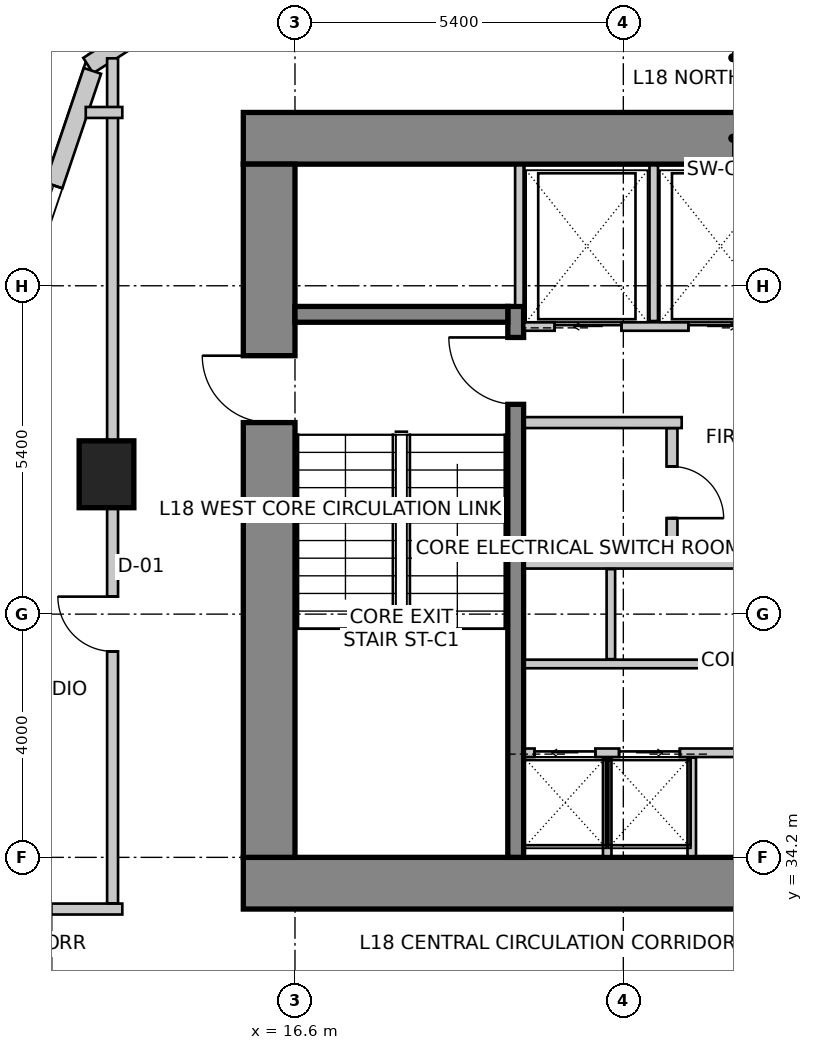
"""IFC4 building model, lengths in metres.
Left out: names, types, materials, properties, quantities, classifications, styles, units other than length and angle.
Written with IfcOpenShell. Run it as: python <this file> out.ifc"""

import sys

from ifc_helpers import new_model, si_unit, direction, frame, frame_2d, origin, origin_2d, place, context, subcontext, project, spatial, rectangle, extrude, source, transform, mapped, element, fill, save


model = new_model("IFC4")
c1 = context("Model", 3, precision=1e-05, world=origin(), true_north=direction((0.0, 1.0)))
c2 = subcontext(c1, "Body", "Model", "MODEL_VIEW")
j1 = project(units=[si_unit("LENGTHUNIT", "METRE"), si_unit("PLANEANGLEUNIT", "RADIAN")], contexts=[c1])
p1 = place(None, origin())
s1 = spatial("IfcSite", under=j1, at=p1, CompositionType="ELEMENT")
p2 = place(p1, origin())
s2 = spatial("IfcBuilding", under=s1, at=p2, CompositionType="ELEMENT")
p3 = place(p2, frame((0.0, 0.0, 75.0)))
s3 = spatial("IfcBuildingStorey", under=s2, at=p3, CompositionType="ELEMENT", Elevation=75.0)
p4 = place(p3, frame((15.75, 46.025, 0.0), z_axis=(0.0, 0.0, 1.0), x_axis=(1.0, 0.0, 0.0)))
e1 = element("IfcWall", 1, at=p4, inside=s3, PredefinedType="SHEAR", context=c2, shape_type="SweptSolid", body=[
    extrude(rectangle(XDim=16.1, YDim=0.85, at=frame_2d((8.05, 0.0))), origin(), (0.0, 0.0, 1.0), 4.0),
])
p5 = place(p3, frame((15.75, 33.775, 0.0), z_axis=(0.0, 0.0, 1.0), x_axis=(1.0, 0.0, 0.0)))
e2 = element("IfcWall", 2, at=p5, inside=s3, PredefinedType="SHEAR", context=c2, shape_type="SweptSolid", body=[
    extrude(rectangle(XDim=16.1, YDim=0.85, at=frame_2d((8.05, 0.0))), origin(), (0.0, 0.0, 1.0), 4.0),
])
m1 = source(origin(), c2, "Body", "SweptSolid", [
    extrude(rectangle(XDim=1.3, YDim=2.15, at=frame_2d((0.65, 1.075))), frame((0.0, 0.435, 0.0), z_axis=(0.0, -1.0, 0.0), x_axis=(1.0, 0.0, 0.0)), (0.0, 0.0, 1.0), 0.87),
])
p6 = place(p5, frame((10.18, 0.0, 0.0)))
e3 = element("IfcOpeningElement", 3, at=p6, cuts=e2, PredefinedType="OPENING", context=c2, shape_type="MappedRepresentation", body=[
    mapped(m1, transform((0.0, 0.0, 0.0), scale=1.0)),
])
p7 = place(p3, frame((16.175, 34.2, 0.0), z_axis=(0.0, 0.0, 1.0), x_axis=(0.0, 1.0, 0.0)))
e4 = element("IfcWall", 4, at=p7, inside=s3, PredefinedType="SHEAR", context=c2, shape_type="SweptSolid", body=[
    extrude(rectangle(XDim=11.4, YDim=0.85, at=frame_2d((5.7, 0.0))), origin(), (0.0, 0.0, 1.0), 4.0),
])
m2 = source(origin(), c2, "Body", "SweptSolid", [
    extrude(rectangle(XDim=1.1, YDim=2.15, at=frame_2d((0.55, 1.075))), frame((0.0, 0.435, 0.0), z_axis=(0.0, -1.0, 0.0), x_axis=(1.0, 0.0, 0.0)), (0.0, 0.0, 1.0), 0.87),
])
p8 = place(p7, frame((7.15, 0.0, 0.0)))
e5 = element("IfcOpeningElement", 5, at=p8, cuts=e4, PredefinedType="OPENING", context=c2, shape_type="MappedRepresentation", body=[
    mapped(m2, transform((0.0, 0.0, 0.0), scale=1.0)),
])
p9 = place(p3, frame((20.23, 34.2, 0.0), z_axis=(0.0, 0.0, 1.0), x_axis=(0.0, 1.0, 0.0)))
e6 = element("IfcWall", 6, at=p9, inside=s3, PredefinedType="SHEAR", context=c2, shape_type="SweptSolid", body=[
    extrude(rectangle(XDim=9.06, YDim=0.26, at=frame_2d((4.53, 0.0))), origin(), (0.0, 0.0, 1.0), 4.0),
])
m3 = source(origin(), c2, "Body", "SweptSolid", [
    extrude(rectangle(XDim=1.1, YDim=2.15, at=frame_2d((0.55, 1.075))), frame((0.0, 0.14, 0.0), z_axis=(0.0, -1.0, 0.0), x_axis=(1.0, 0.0, 0.0)), (0.0, 0.0, 1.0), 0.28),
])
p10 = place(p9, frame((7.45, 0.0, 0.0)))
e7 = element("IfcOpeningElement", 7, at=p10, cuts=e6, PredefinedType="OPENING", context=c2, shape_type="MappedRepresentation", body=[
    mapped(m3, transform((0.0, 0.0, 0.0), scale=1.0)),
])
p11 = place(p3, frame((16.6, 43.13, 0.0), z_axis=(0.0, 0.0, 1.0), x_axis=(1.0, 0.0, 0.0)))
e8 = element("IfcWall", 8, at=p11, inside=s3, PredefinedType="SHEAR", context=c2, shape_type="SweptSolid", body=[
    extrude(rectangle(XDim=3.5, YDim=0.26, at=frame_2d((1.75, 0.0))), origin(), (0.0, 0.0, 1.0), 4.0),
])
m4 = source(origin(), c2, "Body", "SweptSolid", [
    extrude(rectangle(XDim=0.9, YDim=1.1, at=origin_2d()), origin(), (0.0, 0.0, 1.0), 4.0),
])
p12 = place(p3, frame((13.5, 40.5, 0.0), z_axis=(0.0, 0.0, 1.0), x_axis=(1.0, 0.0, 0.0)))
e9 = element("IfcColumn", 9, at=p12, inside=s3, PredefinedType="COLUMN", context=c2, shape_type="MappedRepresentation", body=[
    mapped(m4, transform((0.0, 0.0, 0.0), scale=1.0)),
])
p13 = place(p3, frame((53.961, 47.417, 0.0), z_axis=(0.0, 0.0, 1.0), x_axis=(-0.985865713455, 0.167537443678, 0.0)))
e10 = element("IfcWall", 10, at=p13, inside=s3, PredefinedType="SOLIDWALL", context=c2, shape_type="SweptSolid", body=[
    extrude(rectangle(XDim=32.537, YDim=0.3, at=frame_2d((16.269, 0.0))), origin(), (0.0, 0.0, 1.0), 3.75),
])
m5 = source(origin(), c2, "Body", "SweptSolid", [
    extrude(rectangle(XDim=2.4, YDim=2.2, at=frame_2d((1.2, 1.1))), frame((0.0, 0.16, 0.0), z_axis=(0.0, -1.0, 0.0), x_axis=(1.0, 0.0, 0.0)), (0.0, 0.0, 1.0), 0.32),
])
p14 = place(p13, frame((0.375, 0.0, 0.85)))
e11 = element("IfcOpeningElement", 11, at=p14, cuts=e10, PredefinedType="OPENING", context=c2, shape_type="MappedRepresentation", body=[
    mapped(m5, transform((0.0, 0.0, 0.0), scale=1.0)),
])
m6 = source(origin(), c2, "Body", "SweptSolid", [
    extrude(rectangle(XDim=2.8, YDim=2.4, at=frame_2d((1.4, 1.2))), frame((0.0, 0.16, 0.0), z_axis=(0.0, -1.0, 0.0), x_axis=(1.0, 0.0, 0.0)), (0.0, 0.0, 1.0), 0.32),
])
p15 = place(p13, frame((3.822, 0.0, 0.85)))
e12 = element("IfcOpeningElement", 12, at=p15, cuts=e10, PredefinedType="OPENING", context=c2, shape_type="MappedRepresentation", body=[
    mapped(m6, transform((0.0, 0.0, 0.0), scale=1.0)),
])
p16 = place(p13, frame((8.168, 0.0, 0.85)))
e13 = element("IfcOpeningElement", 13, at=p16, cuts=e10, PredefinedType="OPENING", context=c2, shape_type="MappedRepresentation", body=[
    mapped(m6, transform((0.0, 0.0, 0.0), scale=1.0)),
])
p17 = place(p13, frame((12.513, 0.0, 0.85)))
e14 = element("IfcOpeningElement", 14, at=p17, cuts=e10, PredefinedType="OPENING", context=c2, shape_type="MappedRepresentation", body=[
    mapped(m6, transform((0.0, 0.0, 0.0), scale=1.0)),
])
p18 = place(p13, frame((18.36, 0.0, 0.85)))
e15 = element("IfcOpeningElement", 15, at=p18, cuts=e10, PredefinedType="OPENING", context=c2, shape_type="MappedRepresentation", body=[
    mapped(m6, transform((0.0, 0.0, 0.0), scale=1.0)),
])
p19 = place(p13, frame((24.895, 0.0, 0.85)))
e16 = element("IfcOpeningElement", 16, at=p19, cuts=e10, PredefinedType="OPENING", context=c2, shape_type="MappedRepresentation", body=[
    mapped(m6, transform((0.0, 0.0, 0.0), scale=1.0)),
])
p20 = place(p13, frame((29.395, 0.0, 0.85)))
e17 = element("IfcOpeningElement", 17, at=p20, cuts=e10, PredefinedType="OPENING", context=c2, shape_type="MappedRepresentation", body=[
    mapped(m6, transform((0.0, 0.0, 0.0), scale=1.0)),
])
p21 = place(p3, frame((21.875, 52.742, 0.0), z_axis=(0.0, 0.0, 1.0), x_axis=(-0.843662465249, -0.536873956092, 0.0)))
e18 = element("IfcWall", 18, at=p21, inside=s3, PredefinedType="SOLIDWALL", context=c2, shape_type="SweptSolid", body=[
    extrude(rectangle(XDim=10.284, YDim=0.3, at=frame_2d((5.142, 0.0))), origin(), (0.0, 0.0, 1.0), 3.75),
])
m7 = source(origin(), c2, "Body", "SweptSolid", [
    extrude(rectangle(XDim=0.9, YDim=1.6, at=frame_2d((0.45, 0.8))), frame((0.0, 0.16, 0.0), z_axis=(0.0, -1.0, 0.0), x_axis=(1.0, 0.0, 0.0)), (0.0, 0.0, 1.0), 0.32),
])
p22 = place(p21, frame((0.629, 0.0, 0.85)))
e19 = element("IfcOpeningElement", 19, at=p22, cuts=e18, PredefinedType="OPENING", context=c2, shape_type="MappedRepresentation", body=[
    mapped(m7, transform((0.0, 0.0, 0.0), scale=1.0)),
])
p23 = place(p21, frame((3.542, 0.0, 0.85)))
e20 = element("IfcOpeningElement", 20, at=p23, cuts=e18, PredefinedType="OPENING", context=c2, shape_type="MappedRepresentation", body=[
    mapped(m5, transform((0.0, 0.0, 0.0), scale=1.0)),
])
m8 = source(origin(), c2, "Body", "SweptSolid", [
    extrude(rectangle(XDim=1.5, YDim=1.8, at=frame_2d((0.75, 0.9))), frame((0.0, 0.16, 0.0), z_axis=(0.0, -1.0, 0.0), x_axis=(1.0, 0.0, 0.0)), (0.0, 0.0, 1.0), 0.32),
])
p24 = place(p21, frame((7.903, 0.0, 0.85)))
e21 = element("IfcOpeningElement", 21, at=p24, cuts=e18, PredefinedType="OPENING", context=c2, shape_type="MappedRepresentation", body=[
    mapped(m8, transform((0.0, 0.0, 0.0), scale=1.0)),
])
p25 = place(p3, frame((13.269, 47.134, 0.0), z_axis=(0.0, 0.0, 1.0), x_axis=(-0.319920423265, -0.947444416722, 0.0)))
e22 = element("IfcWall", 22, at=p25, inside=s3, PredefinedType="SOLIDWALL", context=c2, shape_type="SweptSolid", body=[
    extrude(rectangle(XDim=16.135, YDim=0.3, at=frame_2d((8.067, 0.0))), origin(), (0.0, 0.0, 1.0), 3.75),
])
p26 = place(p25, frame((1.988, 0.0, 0.85)))
e23 = element("IfcOpeningElement", 23, at=p26, cuts=e22, PredefinedType="OPENING", context=c2, shape_type="MappedRepresentation", body=[
    mapped(m6, transform((0.0, 0.0, 0.0), scale=1.0)),
])
p27 = place(p25, frame((7.159, 0.0, 0.85)))
e24 = element("IfcOpeningElement", 24, at=p27, cuts=e22, PredefinedType="OPENING", context=c2, shape_type="MappedRepresentation", body=[
    mapped(m5, transform((0.0, 0.0, 0.0), scale=1.0)),
])
p28 = place(p25, frame((11.93, 0.0, 0.85)))
e25 = element("IfcOpeningElement", 25, at=p28, cuts=e22, PredefinedType="OPENING", context=c2, shape_type="MappedRepresentation", body=[
    mapped(m6, transform((0.0, 0.0, 0.0), scale=1.0)),
])
p29 = place(p3, frame((20.37, 42.93, 0.0), z_axis=(0.0, 0.0, 1.0), x_axis=(1.0, 0.0, 0.0)))
e26 = element("IfcWall", 26, at=p29, inside=s3, PredefinedType="SOLIDWALL", context=c2, shape_type="SweptSolid", body=[
    extrude(rectangle(XDim=6.86, YDim=0.14, at=frame_2d((3.43, 0.0))), origin(), (0.0, 0.0, 1.0), 3.75),
])
m9 = source(origin(), c2, "Body", "SweptSolid", [
    extrude(rectangle(XDim=1.1, YDim=2.15, at=frame_2d((0.55, 1.075))), frame((0.0, 0.08, 0.0), z_axis=(0.0, -1.0, 0.0), x_axis=(1.0, 0.0, 0.0)), (0.0, 0.0, 1.0), 0.16),
])
p30 = place(p29, frame((0.5, 0.0, 0.0)))
e27 = element("IfcOpeningElement", 27, at=p30, cuts=e26, PredefinedType="OPENING", context=c2, shape_type="MappedRepresentation", body=[
    mapped(m9, transform((0.0, 0.0, 0.0), scale=1.0)),
])
p31 = place(p29, frame((2.7, 0.0, 0.0)))
e28 = element("IfcOpeningElement", 28, at=p31, cuts=e26, PredefinedType="OPENING", context=c2, shape_type="MappedRepresentation", body=[
    mapped(m9, transform((0.0, 0.0, 0.0), scale=1.0)),
])
p32 = place(p29, frame((5.1, 0.0, 0.0)))
e29 = element("IfcOpeningElement", 29, at=p32, cuts=e26, PredefinedType="OPENING", context=c2, shape_type="MappedRepresentation", body=[
    mapped(m9, transform((0.0, 0.0, 0.0), scale=1.0)),
])
p33 = place(p3, frame((20.29, 43.28, 0.0), z_axis=(0.0, 0.0, 1.0), x_axis=(0.0, 1.0, 0.0)))
e30 = element("IfcWall", 30, at=p33, inside=s3, PredefinedType="SOLIDWALL", context=c2, shape_type="SweptSolid", body=[
    extrude(rectangle(XDim=2.3, YDim=0.14, at=frame_2d((1.15, 0.0))), origin(), (0.0, 0.0, 1.0), 3.75),
])
p34 = place(p3, frame((22.5, 43.02, 0.0), z_axis=(0.0, 0.0, 1.0), x_axis=(0.0, 1.0, 0.0)))
e31 = element("IfcWall", 31, at=p34, inside=s3, PredefinedType="SOLIDWALL", context=c2, shape_type="SweptSolid", body=[
    extrude(rectangle(XDim=2.56, YDim=0.14, at=frame_2d((1.28, 0.0))), origin(), (0.0, 0.0, 1.0), 3.75),
])
p35 = place(p3, frame((20.38, 35.92, 0.0), z_axis=(0.0, 0.0, 1.0), x_axis=(1.0, 0.0, 0.0)))
e32 = element("IfcWall", 32, at=p35, inside=s3, PredefinedType="SOLIDWALL", context=c2, shape_type="SweptSolid", body=[
    extrude(rectangle(XDim=5.65, YDim=0.14, at=frame_2d((2.825, 0.0))), origin(), (0.0, 0.0, 1.0), 3.75),
])
m10 = source(origin(), c2, "Body", "SweptSolid", [
    extrude(rectangle(XDim=1.0, YDim=2.15, at=frame_2d((0.5, 1.075))), frame((0.0, 0.08, 0.0), z_axis=(0.0, -1.0, 0.0), x_axis=(1.0, 0.0, 0.0)), (0.0, 0.0, 1.0), 0.16),
])
p36 = place(p35, frame((0.16, 0.0, 0.0)))
e33 = element("IfcOpeningElement", 33, at=p36, cuts=e32, PredefinedType="OPENING", context=c2, shape_type="MappedRepresentation", body=[
    mapped(m10, transform((0.0, 0.0, 0.0), scale=1.0)),
])
p37 = place(p35, frame((1.55, 0.0, 0.0)))
e34 = element("IfcOpeningElement", 34, at=p37, cuts=e32, PredefinedType="OPENING", context=c2, shape_type="MappedRepresentation", body=[
    mapped(m10, transform((0.0, 0.0, 0.0), scale=1.0)),
])
for number, where, z_axis, x_axis in (
    (35, (21.735, 34.22, 0.0), (0.0, 0.0, 1.0), (0.0, 1.0, 0.0)),
    (36, (23.125, 34.22, 0.0), (0.0, 0.0, 1.0), (0.0, 1.0, 0.0)),
):
    element("IfcWall", number, at=place(p3, frame(where, z_axis=z_axis, x_axis=x_axis)), inside=s3, PredefinedType="SOLIDWALL", context=c2, shape_type="SweptSolid", body=[
        extrude(rectangle(XDim=1.62, YDim=0.14, at=frame_2d((0.81, 0.0))), origin(), (0.0, 0.0, 1.0), 3.042),
    ])
p38 = place(p3, frame((20.38, 37.38, 0.0), z_axis=(0.0, 0.0, 1.0), x_axis=(1.0, 0.0, 0.0)))
e37 = element("IfcWall", 37, at=p38, inside=s3, PredefinedType="SOLIDWALL", context=c2, shape_type="SweptSolid", body=[
    extrude(rectangle(XDim=5.75, YDim=0.14, at=frame_2d((2.875, 0.0))), origin(), (0.0, 0.0, 1.0), 3.75),
])
p39 = place(p3, frame((20.38, 39.04, 0.0), z_axis=(0.0, 0.0, 1.0), x_axis=(1.0, 0.0, 0.0)))
e38 = element("IfcWall", 38, at=p39, inside=s3, PredefinedType="SOLIDWALL", context=c2, shape_type="SweptSolid", body=[
    extrude(rectangle(XDim=5.75, YDim=0.18, at=frame_2d((2.875, 0.0))), origin(), (0.0, 0.0, 1.0), 3.75),
])
p40 = place(p3, frame((21.795, 37.46, 0.0), z_axis=(0.0, 0.0, 1.0), x_axis=(0.0, 1.0, 0.0)))
e39 = element("IfcWall", 39, at=p40, inside=s3, PredefinedType="SOLIDWALL", context=c2, shape_type="SweptSolid", body=[
    extrude(rectangle(XDim=1.48, YDim=0.14, at=frame_2d((0.74, 0.0))), origin(), (0.0, 0.0, 1.0), 3.75),
])
p41 = place(p3, frame((22.96, 41.35, 0.0), z_axis=(0.0, 0.0, 1.0), x_axis=(-1.0, 0.0, 0.0)))
e40 = element("IfcWall", 40, at=p41, inside=s3, PredefinedType="PARTITIONING", context=c2, shape_type="SweptSolid", body=[
    extrude(rectangle(XDim=2.58, YDim=0.18, at=frame_2d((1.29, 0.0))), origin(), (0.0, 0.0, 1.0), 3.75),
])
p42 = place(p3, frame((22.8, 41.256, 0.0), z_axis=(0.0, 0.0, 1.0), x_axis=(0.0, -1.0, 0.0)))
e41 = element("IfcWall", 41, at=p42, inside=s3, PredefinedType="PARTITIONING", context=c2, shape_type="SweptSolid", body=[
    extrude(rectangle(XDim=2.106, YDim=0.18, at=frame_2d((1.053, 0.0))), origin(), (0.0, 0.0, 1.0), 3.75),
])
m11 = source(origin(), c2, "Body", "SweptSolid", [
    extrude(rectangle(XDim=0.85, YDim=2.15, at=frame_2d((0.425, 1.075))), frame((0.0, 0.1, 0.0), z_axis=(0.0, -1.0, 0.0), x_axis=(1.0, 0.0, 0.0)), (0.0, 0.0, 1.0), 0.2),
])
p43 = place(p42, frame((0.628, 0.0, 0.0)))
e42 = element("IfcOpeningElement", 42, at=p43, cuts=e41, PredefinedType="OPENING", context=c2, shape_type="MappedRepresentation", body=[
    mapped(m11, transform((0.0, 0.0, 0.0), scale=1.0)),
])
p44 = place(p3, frame((12.594, 33.35, 0.0), z_axis=(0.0, 0.0, 1.0), x_axis=(1.0, 0.0, 0.0)))
e43 = element("IfcWall", 43, at=p44, inside=s3, PredefinedType="PARTITIONING", context=c2, shape_type="SweptSolid", body=[
    extrude(rectangle(XDim=1.166, YDim=0.18, at=frame_2d((0.583, 0.0))), origin(), (0.0, 0.0, 1.0), 3.75),
])
p45 = place(p3, frame((13.6, 33.444, 0.0), z_axis=(0.0, 0.0, 1.0), x_axis=(0.0, 1.0, 0.0)))
e44 = element("IfcWall", 44, at=p45, inside=s3, PredefinedType="PARTITIONING", context=c2, shape_type="SweptSolid", body=[
    extrude(rectangle(XDim=13.896, YDim=0.18, at=frame_2d((6.948, 0.0))), origin(), (0.0, 0.0, 1.0), 2.892),
])
m12 = source(origin(), c2, "Body", "SweptSolid", [
    extrude(rectangle(XDim=0.9, YDim=2.15, at=frame_2d((0.45, 1.075))), frame((0.0, 0.1, 0.0), z_axis=(0.0, -1.0, 0.0), x_axis=(1.0, 0.0, 0.0)), (0.0, 0.0, 1.0), 0.2),
])
p46 = place(p45, frame((4.144, 0.0, 0.0)))
e45 = element("IfcOpeningElement", 45, at=p46, cuts=e44, PredefinedType="OPENING", context=c2, shape_type="MappedRepresentation", body=[
    mapped(m12, transform((0.0, 0.0, 0.0), scale=1.0)),
])
p47 = place(p3, frame((13.76, 46.45, 0.0), z_axis=(0.0, 0.0, 1.0), x_axis=(-1.0, 0.0, 0.0)))
e46 = element("IfcWall", 46, at=p47, inside=s3, PredefinedType="PARTITIONING", context=c2, shape_type="SweptSolid", body=[
    extrude(rectangle(XDim=0.601, YDim=0.18, at=frame_2d((0.301, 0.0))), origin(), (0.0, 0.0, 1.0), 3.75),
])
m13 = source(origin(), c2, "Body", "SweptSolid", [
    extrude(rectangle(XDim=2.8, YDim=2.4, at=frame_2d((1.4, 1.2))), frame((0.0, -0.015, 0.0), z_axis=(0.0, -1.0, 0.0), x_axis=(1.0, 0.0, 0.0)), (0.0, 0.0, 1.0), 0.06),
])
p48 = place(p26, origin())
e47 = element("IfcWindow", 47, at=p48, inside=s3, PartitioningType="SINGLE_PANEL", PredefinedType="WINDOW", context=c2, shape_type="MappedRepresentation", body=[
    mapped(m13, transform((0.0, 0.0, 0.0), scale=1.0)),
])
fill(e23, e47)
m14 = source(origin(), c2, "Body", "SweptSolid", [
    extrude(rectangle(XDim=1.1, YDim=2.15, at=frame_2d((0.55, 1.075))), frame((0.0, 0.025, 0.0), z_axis=(0.0, -1.0, 0.0), x_axis=(1.0, 0.0, 0.0)), (0.0, 0.0, 1.0), 0.05),
])
p49 = place(p30, origin())
e48 = element("IfcDoor", 48, at=p49, inside=s3, OperationType="SLIDING_TO_LEFT", PredefinedType="DOOR", context=c2, shape_type="MappedRepresentation", body=[
    mapped(m14, transform((0.0, 0.0, 0.0), scale=1.0)),
])
fill(e27, e48)
p50 = place(p31, origin())
e49 = element("IfcDoor", 49, at=p50, inside=s3, OperationType="SLIDING_TO_RIGHT", PredefinedType="DOOR", context=c2, shape_type="MappedRepresentation", body=[
    mapped(m14, transform((0.0, 0.0, 0.0), scale=1.0)),
])
fill(e28, e49)
m15 = source(origin(), c2, "Body", "SweptSolid", [
    extrude(rectangle(XDim=1.0, YDim=2.15, at=frame_2d((0.5, 1.075))), frame((0.0, 0.025, 0.0), z_axis=(0.0, -1.0, 0.0), x_axis=(1.0, 0.0, 0.0)), (0.0, 0.0, 1.0), 0.05),
])
p51 = place(p36, origin())
e50 = element("IfcDoor", 50, at=p51, inside=s3, OperationType="SLIDING_TO_LEFT", PredefinedType="DOOR", context=c2, shape_type="MappedRepresentation", body=[
    mapped(m15, transform((0.0, 0.0, 0.0), scale=1.0)),
])
fill(e33, e50)
p52 = place(p37, origin())
e51 = element("IfcDoor", 51, at=p52, inside=s3, OperationType="SLIDING_TO_RIGHT", PredefinedType="DOOR", context=c2, shape_type="MappedRepresentation", body=[
    mapped(m15, transform((0.0, 0.0, 0.0), scale=1.0)),
])
fill(e34, e51)
m16 = source(origin(), c2, "Body", "SweptSolid", [
    extrude(rectangle(XDim=1.1, YDim=2.15, at=frame_2d((0.55, 1.075))), frame((0.0, 0.025, 0.0), z_axis=(0.0, -1.0, 0.0), x_axis=(1.0, 0.0, 0.0)), (0.0, 0.0, 1.0), 0.05),
])
p53 = place(p10, origin())
e52 = element("IfcDoor", 52, at=p53, inside=s3, OperationType="SINGLE_SWING_RIGHT", PredefinedType="DOOR", context=c2, shape_type="MappedRepresentation", body=[
    mapped(m16, transform((0.0, 0.0, 0.0), scale=1.0)),
])
fill(e7, e52)
p54 = place(p8, origin())
e53 = element("IfcDoor", 53, at=p54, inside=s3, OperationType="SINGLE_SWING_RIGHT", PredefinedType="DOOR", context=c2, shape_type="MappedRepresentation", body=[
    mapped(m16, transform((0.0, 0.0, 0.0), scale=1.0)),
])
fill(e5, e53)
m17 = source(origin(), c2, "Body", "SweptSolid", [
    extrude(rectangle(XDim=0.85, YDim=2.15, at=frame_2d((0.425, 1.075))), frame((0.0, 0.025, 0.0), z_axis=(0.0, -1.0, 0.0), x_axis=(1.0, 0.0, 0.0)), (0.0, 0.0, 1.0), 0.05),
])
p55 = place(p43, origin())
e54 = element("IfcDoor", 54, at=p55, inside=s3, OperationType="SINGLE_SWING_RIGHT", PredefinedType="DOOR", context=c2, shape_type="MappedRepresentation", body=[
    mapped(m17, transform((0.0, 0.0, 0.0), scale=1.0)),
])
fill(e42, e54)
m18 = source(origin(), c2, "Body", "SweptSolid", [
    extrude(rectangle(XDim=0.9, YDim=2.15, at=frame_2d((0.45, 1.075))), frame((0.0, 0.025, 0.0), z_axis=(0.0, -1.0, 0.0), x_axis=(1.0, 0.0, 0.0)), (0.0, 0.0, 1.0), 0.05),
])
p56 = place(p46, origin())
e55 = element("IfcDoor", 55, at=p56, inside=s3, OperationType="SINGLE_SWING_RIGHT", PredefinedType="DOOR", context=c2, shape_type="MappedRepresentation", body=[
    mapped(m18, transform((0.0, 0.0, 0.0), scale=1.0)),
])
fill(e45, e55)
save(model, sys.argv[1])
